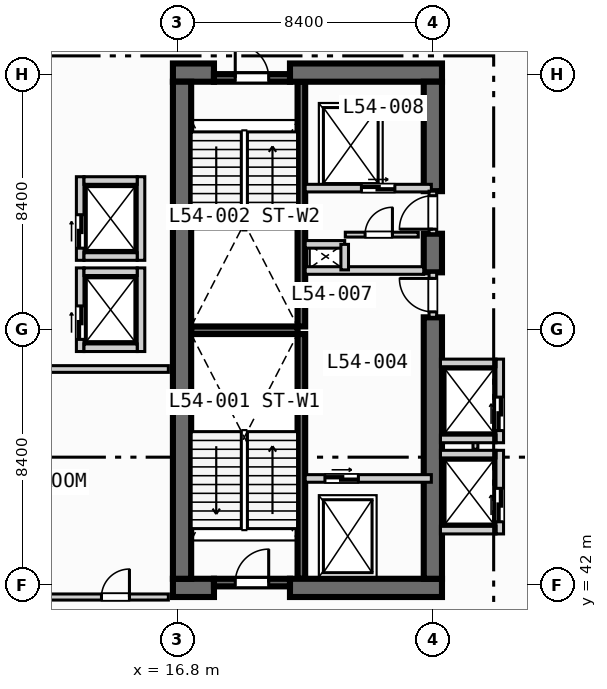
"""IFC4 building model, lengths in metres.
Left out: names, types, materials, properties, quantities, classifications, styles, units other than length and angle.
Written with IfcOpenShell. Run it as: python <this file> out.ifc"""

import sys

from ifc_helpers import new_model, si_unit, direction, frame, frame_2d, origin, place, context, subcontext, project, spatial, rectangle, extrude, element, fill, save


model = new_model("IFC4")
c1 = context("Model", 3, precision=1e-05, world=origin(), true_north=direction((0.0, 1.0)))
c2 = subcontext(c1, "Body", "Model", "MODEL_VIEW")
j1 = project(units=[si_unit("LENGTHUNIT", "METRE"), si_unit("PLANEANGLEUNIT", "RADIAN")], contexts=[c1])
p1 = place(None, origin())
s1 = spatial("IfcSite", under=j1, at=p1, CompositionType="ELEMENT")
p2 = place(p1, origin())
s2 = spatial("IfcBuilding", under=s1, at=p2, CompositionType="ELEMENT")
p3 = place(p2, frame((0.0, 0.0, 219.8)))
s3 = spatial("IfcBuildingStorey", under=s2, at=p3, CompositionType="ELEMENT", Elevation=219.8)
for number, where, z_axis, x_axis in (
    (1, (20.875, 42.2, 0.0), (0.0, 0.0, 1.0), (0.0, 1.0, 0.0)),
    (2, (20.875, 50.5, 0.0), (0.0, 0.0, 1.0), (0.0, 1.0, 0.0)),
):
    element("IfcWall", number, at=place(p3, frame(where, z_axis=z_axis, x_axis=x_axis)), inside=s3, PredefinedType="SOLIDWALL", context=c2, shape_type="SweptSolid", body=[
        extrude(rectangle(XDim=8.05, YDim=0.25, at=frame_2d((4.025, 0.0))), origin(), (0.0, 0.0, 1.0), 3.97),
    ])
p4 = place(p3, frame((17.25, 50.375, 0.0), z_axis=(0.0, 0.0, 1.0), x_axis=(1.0, 0.0, 0.0)))
e3 = element("IfcWall", 3, at=p4, inside=s3, PredefinedType="SOLIDWALL", context=c2, shape_type="SweptSolid", body=[
    extrude(rectangle(XDim=3.5, YDim=0.25, at=frame_2d((1.75, 0.0))), origin(), (0.0, 0.0, 1.0), 3.97),
])
p5 = place(p3, frame((16.65, 41.9, 0.0), z_axis=(0.0, 0.0, 1.0), x_axis=(1.0, 0.0, 0.0)))
e4 = element("IfcWall", 4, at=p5, inside=s3, PredefinedType="SHEAR", context=c2, shape_type="SweptSolid", body=[
    extrude(rectangle(XDim=1.35, YDim=0.6, at=frame_2d((0.675, 0.0))), origin(), (0.0, 0.0, 1.0), 3.97),
])
p6 = place(p3, frame((20.5, 41.9, 0.0), z_axis=(0.0, 0.0, 1.0), x_axis=(1.0, 0.0, 0.0)))
e5 = element("IfcWall", 5, at=p6, inside=s3, PredefinedType="SHEAR", context=c2, shape_type="SweptSolid", body=[
    extrude(rectangle(XDim=5.0, YDim=0.6, at=frame_2d((2.5, 0.0))), origin(), (0.0, 0.0, 1.0), 3.97),
])
p7 = place(p3, frame((16.65, 58.85, 0.0), z_axis=(0.0, 0.0, 1.0), x_axis=(1.0, 0.0, 0.0)))
e6 = element("IfcWall", 6, at=p7, inside=s3, PredefinedType="SHEAR", context=c2, shape_type="SweptSolid", body=[
    extrude(rectangle(XDim=1.35, YDim=0.6, at=frame_2d((0.675, 0.0))), origin(), (0.0, 0.0, 1.0), 3.97),
])
p8 = place(p3, frame((20.5, 58.85, 0.0), z_axis=(0.0, 0.0, 1.0), x_axis=(1.0, 0.0, 0.0)))
e7 = element("IfcWall", 7, at=p8, inside=s3, PredefinedType="SHEAR", context=c2, shape_type="SweptSolid", body=[
    extrude(rectangle(XDim=5.0, YDim=0.6, at=frame_2d((2.5, 0.0))), origin(), (0.0, 0.0, 1.0), 3.97),
])
p9 = place(p3, frame((16.95, 42.2, 0.0), z_axis=(0.0, 0.0, 1.0), x_axis=(0.0, 1.0, 0.0)))
e8 = element("IfcWall", 8, at=p9, inside=s3, PredefinedType="SHEAR", context=c2, shape_type="SweptSolid", body=[
    extrude(rectangle(XDim=16.35, YDim=0.6, at=frame_2d((8.175, 0.0))), origin(), (0.0, 0.0, 1.0), 3.97),
])
p10 = place(p3, frame((25.2, 42.2, 0.0), z_axis=(0.0, 0.0, 1.0), x_axis=(0.0, 1.0, 0.0)))
e9 = element("IfcWall", 9, at=p10, inside=s3, PredefinedType="SHEAR", context=c2, shape_type="SweptSolid", body=[
    extrude(rectangle(XDim=8.6, YDim=0.6, at=frame_2d((4.3, 0.0))), origin(), (0.0, 0.0, 1.0), 3.97),
])
p11 = place(p3, frame((25.2, 52.28, 0.0), z_axis=(0.0, 0.0, 1.0), x_axis=(0.0, 1.0, 0.0)))
e10 = element("IfcWall", 10, at=p11, inside=s3, PredefinedType="SHEAR", context=c2, shape_type="SweptSolid", body=[
    extrude(rectangle(XDim=1.27, YDim=0.6, at=frame_2d((0.635, 0.0))), origin(), (0.0, 0.0, 1.0), 3.97),
])
p12 = place(p3, frame((25.2, 54.95, 0.0), z_axis=(0.0, 0.0, 1.0), x_axis=(0.0, 1.0, 0.0)))
e11 = element("IfcWall", 11, at=p12, inside=s3, PredefinedType="SHEAR", context=c2, shape_type="SweptSolid", body=[
    extrude(rectangle(XDim=3.6, YDim=0.6, at=frame_2d((1.8, 0.0))), origin(), (0.0, 0.0, 1.0), 3.97),
])
p13 = place(p3, frame((18.0, 42.075, 0.0), z_axis=(0.0, 0.0, 1.0), x_axis=(1.0, 0.0, 0.0)))
e12 = element("IfcWall", 12, at=p13, inside=s3, PredefinedType="SOLIDWALL", context=c2, shape_type="SweptSolid", body=[
    extrude(rectangle(XDim=2.5, YDim=0.25, at=frame_2d((1.25, 0.0))), origin(), (0.0, 0.0, 1.0), 3.97),
])
p14 = place(p13, frame((0.7, 0.0, 0.0)))
e13 = element("IfcOpeningElement", 13, at=p14, cuts=e12, PredefinedType="OPENING", context=c2, shape_type="SweptSolid", body=[
    extrude(rectangle(XDim=1.1, YDim=2.15, at=frame_2d((0.55, 1.075))), frame((0.0, 0.135, 0.0), z_axis=(0.0, -1.0, 0.0), x_axis=(1.0, 0.0, 0.0)), (0.0, 0.0, 1.0), 0.27),
])
p15 = place(p3, frame((18.0, 58.675, 0.0), z_axis=(0.0, 0.0, 1.0), x_axis=(1.0, 0.0, 0.0)))
e14 = element("IfcWall", 14, at=p15, inside=s3, PredefinedType="SOLIDWALL", context=c2, shape_type="SweptSolid", body=[
    extrude(rectangle(XDim=2.5, YDim=0.25, at=frame_2d((1.25, 0.0))), origin(), (0.0, 0.0, 1.0), 3.97),
])
p16 = place(p15, frame((0.7, 0.0, 0.0)))
e15 = element("IfcOpeningElement", 15, at=p16, cuts=e14, PredefinedType="OPENING", context=c2, shape_type="SweptSolid", body=[
    extrude(rectangle(XDim=1.1, YDim=2.15, at=frame_2d((0.55, 1.075))), frame((0.0, 0.135, 0.0), z_axis=(0.0, -1.0, 0.0), x_axis=(1.0, 0.0, 0.0)), (0.0, 0.0, 1.0), 0.27),
])
p17 = place(p3, frame((21.0, 45.5, 0.0), z_axis=(0.0, 0.0, 1.0), x_axis=(1.0, 0.0, 0.0)))
e16 = element("IfcWall", 16, at=p17, inside=s3, PredefinedType="SOLIDWALL", context=c2, shape_type="SweptSolid", body=[
    extrude(rectangle(XDim=4.15, YDim=0.25, at=frame_2d((2.075, 0.0))), origin(), (0.0, 0.0, 1.0), 3.97),
])
p18 = place(p17, frame((0.65, 0.0, 0.0)))
e17 = element("IfcOpeningElement", 17, at=p18, cuts=e16, PredefinedType="OPENING", context=c2, shape_type="SweptSolid", body=[
    extrude(rectangle(XDim=1.1, YDim=2.15, at=frame_2d((0.55, 1.075))), frame((0.0, 0.135, 0.0), z_axis=(0.0, -1.0, 0.0), x_axis=(1.0, 0.0, 0.0)), (0.0, 0.0, 1.0), 0.27),
])
p19 = place(p3, frame((25.2, 50.8, 0.0), z_axis=(0.0, 0.0, 1.0), x_axis=(0.0, 1.0, 0.0)))
e18 = element("IfcWall", 18, at=p19, inside=s3, PredefinedType="SOLIDWALL", context=c2, shape_type="SweptSolid", body=[
    extrude(rectangle(XDim=1.48, YDim=0.25, at=frame_2d((0.74, 0.0))), origin(), (0.0, 0.0, 1.0), 3.97),
])
p20 = place(p19, frame((0.18, 0.0, 0.0)))
e19 = element("IfcOpeningElement", 19, at=p20, cuts=e18, PredefinedType="OPENING", context=c2, shape_type="SweptSolid", body=[
    extrude(rectangle(XDim=1.1, YDim=2.15, at=frame_2d((0.55, 1.075))), frame((0.0, 0.135, 0.0), z_axis=(0.0, -1.0, 0.0), x_axis=(1.0, 0.0, 0.0)), (0.0, 0.0, 1.0), 0.27),
])
p21 = place(p3, frame((21.0, 52.34, 0.0), z_axis=(0.0, 0.0, 1.0), x_axis=(1.0, 0.0, 0.0)))
e20 = element("IfcWall", 20, at=p21, inside=s3, PredefinedType="SOLIDWALL", context=c2, shape_type="SweptSolid", body=[
    extrude(rectangle(XDim=3.9, YDim=0.25, at=frame_2d((1.95, 0.0))), origin(), (0.0, 0.0, 1.0), 3.97),
])
p22 = place(p3, frame((21.0, 55.05, 0.0), z_axis=(0.0, 0.0, 1.0), x_axis=(1.0, 0.0, 0.0)))
e21 = element("IfcWall", 21, at=p22, inside=s3, PredefinedType="SOLIDWALL", context=c2, shape_type="SweptSolid", body=[
    extrude(rectangle(XDim=4.15, YDim=0.25, at=frame_2d((2.075, 0.0))), origin(), (0.0, 0.0, 1.0), 3.97),
])
p23 = place(p22, frame((1.85, 0.0, 0.0)))
e22 = element("IfcOpeningElement", 22, at=p23, cuts=e21, PredefinedType="OPENING", context=c2, shape_type="SweptSolid", body=[
    extrude(rectangle(XDim=1.1, YDim=2.15, at=frame_2d((0.55, 1.075))), frame((0.0, 0.135, 0.0), z_axis=(0.0, -1.0, 0.0), x_axis=(1.0, 0.0, 0.0)), (0.0, 0.0, 1.0), 0.27),
])
p24 = place(p3, frame((25.2, 53.55, 0.0), z_axis=(0.0, 0.0, 1.0), x_axis=(0.0, 1.0, 0.0)))
e23 = element("IfcWall", 23, at=p24, inside=s3, PredefinedType="SOLIDWALL", context=c2, shape_type="SweptSolid", body=[
    extrude(rectangle(XDim=1.4, YDim=0.25, at=frame_2d((0.7, 0.0))), origin(), (0.0, 0.0, 1.0), 3.97),
])
p25 = place(p24, frame((0.15, 0.0, 0.0)))
e24 = element("IfcOpeningElement", 24, at=p25, cuts=e23, PredefinedType="OPENING", context=c2, shape_type="SweptSolid", body=[
    extrude(rectangle(XDim=1.1, YDim=2.15, at=frame_2d((0.55, 1.075))), frame((0.0, 0.135, 0.0), z_axis=(0.0, -1.0, 0.0), x_axis=(1.0, 0.0, 0.0)), (0.0, 0.0, 1.0), 0.27),
])
p26 = place(p3, frame((21.0, 53.2, 0.0), z_axis=(0.0, 0.0, 1.0), x_axis=(1.0, 0.0, 0.0)))
e25 = element("IfcWall", 25, at=p26, inside=s3, PredefinedType="SOLIDWALL", context=c2, shape_type="SweptSolid", body=[
    extrude(rectangle(XDim=1.3, YDim=0.25, at=frame_2d((0.65, 0.0))), origin(), (0.0, 0.0, 1.0), 3.97),
])
p27 = place(p3, frame((22.3, 52.36, 0.0), z_axis=(0.0, 0.0, 1.0), x_axis=(0.0, 1.0, 0.0)))
e26 = element("IfcWall", 26, at=p27, inside=s3, PredefinedType="SOLIDWALL", context=c2, shape_type="SweptSolid", body=[
    extrude(rectangle(XDim=0.84, YDim=0.25, at=frame_2d((0.42, 0.0))), origin(), (0.0, 0.0, 1.0), 3.97),
])
p28 = place(p3, frame((22.32, 53.52, 0.0), z_axis=(0.0, 0.0, 1.0), x_axis=(1.0, 0.0, 0.0)))
e27 = element("IfcWall", 27, at=p28, inside=s3, PredefinedType="PARTITIONING", context=c2, shape_type="SweptSolid", body=[
    extrude(rectangle(XDim=2.4, YDim=0.16, at=frame_2d((1.2, 0.0))), origin(), (0.0, 0.0, 1.0), 3.97),
])
p29 = place(p28, frame((0.65, 0.0, 0.0)))
e28 = element("IfcOpeningElement", 28, at=p29, cuts=e27, PredefinedType="OPENING", context=c2, shape_type="SweptSolid", body=[
    extrude(rectangle(XDim=0.9, YDim=2.1, at=frame_2d((0.45, 1.05))), frame((0.0, 0.09, 0.0), z_axis=(0.0, -1.0, 0.0), x_axis=(1.0, 0.0, 0.0)), (0.0, 0.0, 1.0), 0.18),
])
p30 = place(p3, frame((13.6, 49.675, 0.0), z_axis=(0.0, 0.0, 1.0), x_axis=(0.0, 1.0, 0.0)))
e29 = element("IfcWall", 29, at=p30, inside=s3, PredefinedType="SOLIDWALL", context=c2, shape_type="SweptSolid", body=[
    extrude(rectangle(XDim=2.75, YDim=0.25, at=frame_2d((1.375, 0.0))), origin(), (0.0, 0.0, 1.0), 3.97),
])
p31 = place(p30, frame((0.4, 0.0, 0.0)))
e30 = element("IfcOpeningElement", 30, at=p31, cuts=e29, PredefinedType="OPENING", context=c2, shape_type="SweptSolid", body=[
    extrude(rectangle(XDim=1.1, YDim=2.15, at=frame_2d((0.55, 1.075))), frame((0.0, 0.135, 0.0), z_axis=(0.0, -1.0, 0.0), x_axis=(1.0, 0.0, 0.0)), (0.0, 0.0, 1.0), 0.27),
])
p32 = place(p3, frame((15.6, 49.675, 0.0), z_axis=(0.0, 0.0, 1.0), x_axis=(0.0, 1.0, 0.0)))
e31 = element("IfcWall", 31, at=p32, inside=s3, PredefinedType="SOLIDWALL", context=c2, shape_type="SweptSolid", body=[
    extrude(rectangle(XDim=2.75, YDim=0.25, at=frame_2d((1.375, 0.0))), origin(), (0.0, 0.0, 1.0), 3.97),
])
for number, where, z_axis, x_axis in (
    (32, (13.725, 49.8, 0.0), (0.0, 0.0, 1.0), (1.0, 0.0, 0.0)),
    (33, (13.725, 52.3, 0.0), (0.0, 0.0, 1.0), (1.0, 0.0, 0.0)),
):
    element("IfcWall", number, at=place(p3, frame(where, z_axis=z_axis, x_axis=x_axis)), inside=s3, PredefinedType="SOLIDWALL", context=c2, shape_type="SweptSolid", body=[
        extrude(rectangle(XDim=1.75, YDim=0.25, at=frame_2d((0.875, 0.0))), origin(), (0.0, 0.0, 1.0), 3.97),
    ])
p33 = place(p3, frame((13.6, 52.675, 0.0), z_axis=(0.0, 0.0, 1.0), x_axis=(0.0, 1.0, 0.0)))
e34 = element("IfcWall", 34, at=p33, inside=s3, PredefinedType="SOLIDWALL", context=c2, shape_type="SweptSolid", body=[
    extrude(rectangle(XDim=2.75, YDim=0.25, at=frame_2d((1.375, 0.0))), origin(), (0.0, 0.0, 1.0), 3.97),
])
p34 = place(p33, frame((0.4, 0.0, 0.0)))
e35 = element("IfcOpeningElement", 35, at=p34, cuts=e34, PredefinedType="OPENING", context=c2, shape_type="SweptSolid", body=[
    extrude(rectangle(XDim=1.1, YDim=2.15, at=frame_2d((0.55, 1.075))), frame((0.0, 0.135, 0.0), z_axis=(0.0, -1.0, 0.0), x_axis=(1.0, 0.0, 0.0)), (0.0, 0.0, 1.0), 0.27),
])
p35 = place(p3, frame((15.6, 52.675, 0.0), z_axis=(0.0, 0.0, 1.0), x_axis=(0.0, 1.0, 0.0)))
e36 = element("IfcWall", 36, at=p35, inside=s3, PredefinedType="SOLIDWALL", context=c2, shape_type="SweptSolid", body=[
    extrude(rectangle(XDim=2.75, YDim=0.25, at=frame_2d((1.375, 0.0))), origin(), (0.0, 0.0, 1.0), 3.97),
])
for number, where, z_axis, x_axis in (
    (37, (13.725, 52.8, 0.0), (0.0, 0.0, 1.0), (1.0, 0.0, 0.0)),
    (38, (13.725, 55.3, 0.0), (0.0, 0.0, 1.0), (1.0, 0.0, 0.0)),
):
    element("IfcWall", number, at=place(p3, frame(where, z_axis=z_axis, x_axis=x_axis)), inside=s3, PredefinedType="SOLIDWALL", context=c2, shape_type="SweptSolid", body=[
        extrude(rectangle(XDim=1.75, YDim=0.25, at=frame_2d((0.875, 0.0))), origin(), (0.0, 0.0, 1.0), 3.97),
    ])
p36 = place(p3, frame((27.4, 43.675, 0.0), z_axis=(0.0, 0.0, 1.0), x_axis=(0.0, 1.0, 0.0)))
e39 = element("IfcWall", 39, at=p36, inside=s3, PredefinedType="SOLIDWALL", context=c2, shape_type="SweptSolid", body=[
    extrude(rectangle(XDim=2.75, YDim=0.25, at=frame_2d((1.375, 0.0))), origin(), (0.0, 0.0, 1.0), 3.97),
])
p37 = place(p36, frame((0.4, 0.0, 0.0)))
e40 = element("IfcOpeningElement", 40, at=p37, cuts=e39, PredefinedType="OPENING", context=c2, shape_type="SweptSolid", body=[
    extrude(rectangle(XDim=1.1, YDim=2.15, at=frame_2d((0.55, 1.075))), frame((0.0, 0.135, 0.0), z_axis=(0.0, -1.0, 0.0), x_axis=(1.0, 0.0, 0.0)), (0.0, 0.0, 1.0), 0.27),
])
for number, where, z_axis, x_axis in (
    (41, (25.45, 43.8, 0.0), (0.0, 0.0, 1.0), (1.0, 0.0, 0.0)),
    (42, (25.45, 46.3, 0.0), (0.0, 0.0, 1.0), (1.0, 0.0, 0.0)),
):
    element("IfcWall", number, at=place(p3, frame(where, z_axis=z_axis, x_axis=x_axis)), inside=s3, PredefinedType="SOLIDWALL", context=c2, shape_type="SweptSolid", body=[
        extrude(rectangle(XDim=1.825, YDim=0.25, at=frame_2d((0.913, 0.0))), origin(), (0.0, 0.0, 1.0), 3.97),
    ])
p38 = place(p3, frame((26.6, 46.46, 0.0), z_axis=(0.0, 0.0, 1.0), x_axis=(0.0, 1.0, 0.0)))
e43 = element("IfcWall", 43, at=p38, inside=s3, PredefinedType="PARTITIONING", context=c2, shape_type="SweptSolid", body=[
    extrude(rectangle(XDim=0.88, YDim=0.16, at=frame_2d((0.44, 0.0))), origin(), (0.0, 0.0, 1.0), 3.97),
])
p39 = place(p3, frame((27.4, 46.675, 0.0), z_axis=(0.0, 0.0, 1.0), x_axis=(0.0, 1.0, 0.0)))
e44 = element("IfcWall", 44, at=p39, inside=s3, PredefinedType="SOLIDWALL", context=c2, shape_type="SweptSolid", body=[
    extrude(rectangle(XDim=2.75, YDim=0.25, at=frame_2d((1.375, 0.0))), origin(), (0.0, 0.0, 1.0), 3.97),
])
p40 = place(p39, frame((0.4, 0.0, 0.0)))
e45 = element("IfcOpeningElement", 45, at=p40, cuts=e44, PredefinedType="OPENING", context=c2, shape_type="SweptSolid", body=[
    extrude(rectangle(XDim=1.1, YDim=2.15, at=frame_2d((0.55, 1.075))), frame((0.0, 0.135, 0.0), z_axis=(0.0, -1.0, 0.0), x_axis=(1.0, 0.0, 0.0)), (0.0, 0.0, 1.0), 0.27),
])
for number, where, z_axis, x_axis in (
    (46, (25.45, 46.8, 0.0), (0.0, 0.0, 1.0), (1.0, 0.0, 0.0)),
    (47, (25.45, 49.3, 0.0), (0.0, 0.0, 1.0), (1.0, 0.0, 0.0)),
):
    element("IfcWall", number, at=place(p3, frame(where, z_axis=z_axis, x_axis=x_axis)), inside=s3, PredefinedType="SOLIDWALL", context=c2, shape_type="SweptSolid", body=[
        extrude(rectangle(XDim=1.825, YDim=0.25, at=frame_2d((0.913, 0.0))), origin(), (0.0, 0.0, 1.0), 3.97),
    ])
p41 = place(p3, frame((0.3, 41.6, 0.0), z_axis=(0.0, 0.0, 1.0), x_axis=(1.0, 0.0, 0.0)))
e48 = element("IfcWall", 48, at=p41, inside=s3, PredefinedType="PARTITIONING", context=c2, shape_type="SweptSolid", body=[
    extrude(rectangle(XDim=16.2, YDim=0.2, at=frame_2d((8.1, 0.0))), origin(), (0.0, 0.0, 1.0), 3.97),
])
p42 = place(p41, frame((14.0, 0.0, 0.0)))
e49 = element("IfcOpeningElement", 49, at=p42, cuts=e48, PredefinedType="OPENING", context=c2, shape_type="SweptSolid", body=[
    extrude(rectangle(XDim=0.92, YDim=2.1, at=frame_2d((0.46, 1.05))), frame((0.0, 0.11, 0.0), z_axis=(0.0, -1.0, 0.0), x_axis=(1.0, 0.0, 0.0)), (0.0, 0.0, 1.0), 0.22),
])
p43 = place(p3, frame((0.3, 49.1, 0.0), z_axis=(0.0, 0.0, 1.0), x_axis=(1.0, 0.0, 0.0)))
e50 = element("IfcWall", 50, at=p43, inside=s3, PredefinedType="PARTITIONING", context=c2, shape_type="SweptSolid", body=[
    extrude(rectangle(XDim=16.2, YDim=0.22, at=frame_2d((8.1, 0.0))), origin(), (0.0, 0.0, 1.0), 3.97),
])
p44 = place(p14, origin())
e51 = element("IfcDoor", 51, at=p44, inside=s3, OperationType="SINGLE_SWING_RIGHT", PredefinedType="DOOR", context=c2, shape_type="SweptSolid", body=[
    extrude(rectangle(XDim=1.1, YDim=2.15, at=frame_2d((0.55, 1.075))), frame((0.0, 0.025, 0.0), z_axis=(0.0, -1.0, 0.0), x_axis=(1.0, 0.0, 0.0)), (0.0, 0.0, 1.0), 0.05),
])
fill(e13, e51)
p45 = place(p16, origin())
e52 = element("IfcDoor", 52, at=p45, inside=s3, OperationType="SINGLE_SWING_LEFT", PredefinedType="DOOR", context=c2, shape_type="SweptSolid", body=[
    extrude(rectangle(XDim=1.1, YDim=2.15, at=frame_2d((0.55, 1.075))), frame((0.0, 0.025, 0.0), z_axis=(0.0, -1.0, 0.0), x_axis=(1.0, 0.0, 0.0)), (0.0, 0.0, 1.0), 0.05),
])
fill(e15, e52)
p46 = place(p18, origin())
e53 = element("IfcDoor", 53, at=p46, inside=s3, OperationType="SLIDING_TO_LEFT", PredefinedType="DOOR", context=c2, shape_type="SweptSolid", body=[
    extrude(rectangle(XDim=1.1, YDim=2.15, at=frame_2d((0.55, 1.075))), frame((0.0, 0.025, 0.0), z_axis=(0.0, -1.0, 0.0), x_axis=(1.0, 0.0, 0.0)), (0.0, 0.0, 1.0), 0.05),
])
fill(e17, e53)
p47 = place(p20, origin())
e54 = element("IfcDoor", 54, at=p47, inside=s3, OperationType="SINGLE_SWING_RIGHT", PredefinedType="DOOR", context=c2, shape_type="SweptSolid", body=[
    extrude(rectangle(XDim=1.1, YDim=2.15, at=frame_2d((0.55, 1.075))), frame((0.0, 0.025, 0.0), z_axis=(0.0, -1.0, 0.0), x_axis=(1.0, 0.0, 0.0)), (0.0, 0.0, 1.0), 0.05),
])
fill(e19, e54)
p48 = place(p23, origin())
e55 = element("IfcDoor", 55, at=p48, inside=s3, OperationType="SLIDING_TO_LEFT", PredefinedType="DOOR", context=c2, shape_type="SweptSolid", body=[
    extrude(rectangle(XDim=1.1, YDim=2.15, at=frame_2d((0.55, 1.075))), frame((0.0, 0.025, 0.0), z_axis=(0.0, -1.0, 0.0), x_axis=(1.0, 0.0, 0.0)), (0.0, 0.0, 1.0), 0.05),
])
fill(e22, e55)
p49 = place(p25, origin())
e56 = element("IfcDoor", 56, at=p49, inside=s3, OperationType="SINGLE_SWING_LEFT", PredefinedType="DOOR", context=c2, shape_type="SweptSolid", body=[
    extrude(rectangle(XDim=1.1, YDim=2.15, at=frame_2d((0.55, 1.075))), frame((0.0, 0.025, 0.0), z_axis=(0.0, -1.0, 0.0), x_axis=(1.0, 0.0, 0.0)), (0.0, 0.0, 1.0), 0.05),
])
fill(e24, e56)
p50 = place(p29, origin())
e57 = element("IfcDoor", 57, at=p50, inside=s3, OperationType="SINGLE_SWING_RIGHT", PredefinedType="DOOR", context=c2, shape_type="SweptSolid", body=[
    extrude(rectangle(XDim=0.9, YDim=2.1, at=frame_2d((0.45, 1.05))), frame((0.0, 0.025, 0.0), z_axis=(0.0, -1.0, 0.0), x_axis=(1.0, 0.0, 0.0)), (0.0, 0.0, 1.0), 0.05),
])
fill(e28, e57)
p51 = place(p31, origin())
e58 = element("IfcDoor", 58, at=p51, inside=s3, OperationType="SLIDING_TO_LEFT", PredefinedType="DOOR", context=c2, shape_type="SweptSolid", body=[
    extrude(rectangle(XDim=1.1, YDim=2.15, at=frame_2d((0.55, 1.075))), frame((0.0, 0.025, 0.0), z_axis=(0.0, -1.0, 0.0), x_axis=(1.0, 0.0, 0.0)), (0.0, 0.0, 1.0), 0.05),
])
fill(e30, e58)
p52 = place(p34, origin())
e59 = element("IfcDoor", 59, at=p52, inside=s3, OperationType="SLIDING_TO_LEFT", PredefinedType="DOOR", context=c2, shape_type="SweptSolid", body=[
    extrude(rectangle(XDim=1.1, YDim=2.15, at=frame_2d((0.55, 1.075))), frame((0.0, 0.025, 0.0), z_axis=(0.0, -1.0, 0.0), x_axis=(1.0, 0.0, 0.0)), (0.0, 0.0, 1.0), 0.05),
])
fill(e35, e59)
p53 = place(p37, origin())
e60 = element("IfcDoor", 60, at=p53, inside=s3, OperationType="SLIDING_TO_LEFT", PredefinedType="DOOR", context=c2, shape_type="SweptSolid", body=[
    extrude(rectangle(XDim=1.1, YDim=2.15, at=frame_2d((0.55, 1.075))), frame((0.0, 0.025, 0.0), z_axis=(0.0, -1.0, 0.0), x_axis=(1.0, 0.0, 0.0)), (0.0, 0.0, 1.0), 0.05),
])
fill(e40, e60)
p54 = place(p40, origin())
e61 = element("IfcDoor", 61, at=p54, inside=s3, OperationType="SLIDING_TO_LEFT", PredefinedType="DOOR", context=c2, shape_type="SweptSolid", body=[
    extrude(rectangle(XDim=1.1, YDim=2.15, at=frame_2d((0.55, 1.075))), frame((0.0, 0.025, 0.0), z_axis=(0.0, -1.0, 0.0), x_axis=(1.0, 0.0, 0.0)), (0.0, 0.0, 1.0), 0.05),
])
fill(e45, e61)
p55 = place(p42, origin())
e62 = element("IfcDoor", 62, at=p55, inside=s3, OperationType="SINGLE_SWING_RIGHT", PredefinedType="DOOR", context=c2, shape_type="SweptSolid", body=[
    extrude(rectangle(XDim=0.92, YDim=2.1, at=frame_2d((0.46, 1.05))), frame((0.0, 0.025, 0.0), z_axis=(0.0, -1.0, 0.0), x_axis=(1.0, 0.0, 0.0)), (0.0, 0.0, 1.0), 0.05),
])
fill(e49, e62)
save(model, sys.argv[1])
